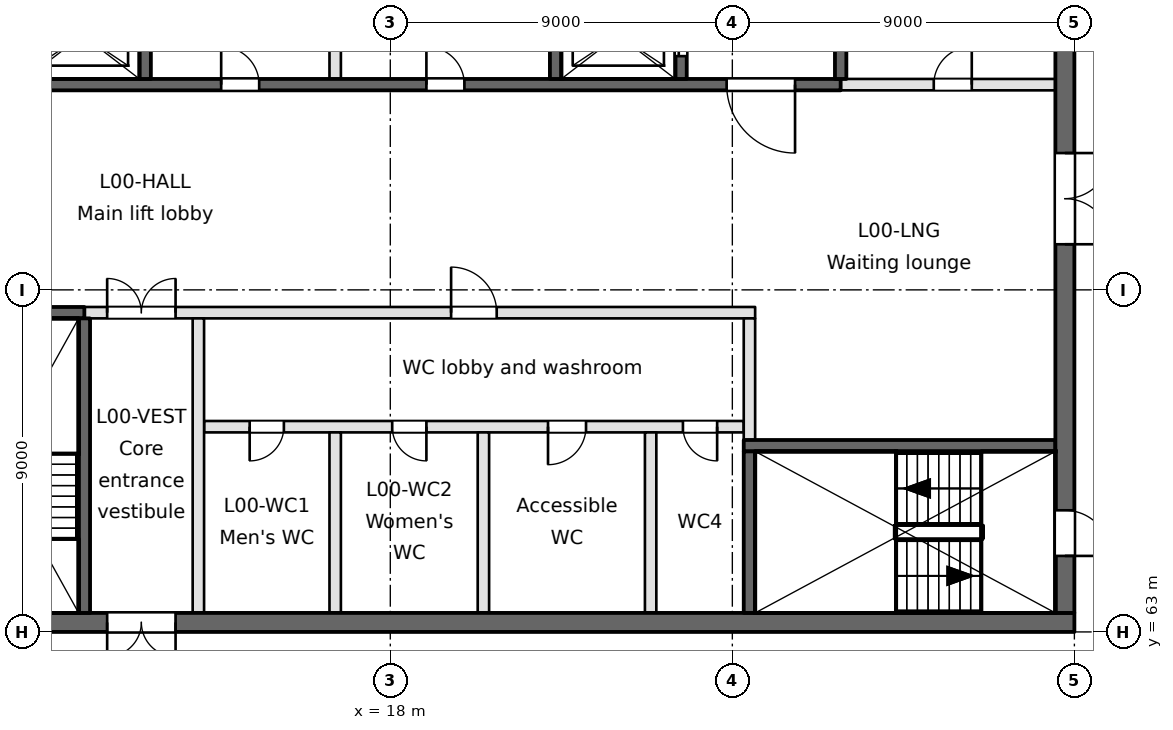
"""IFC4 building model, lengths in metres.
Left out: names, types, materials, properties, quantities, classifications, styles, units other than length and angle.
Written with IfcOpenShell. Run it as: python <this file> out.ifc"""

import sys

from ifc_helpers import new_model, si_unit, direction, frame, frame_2d, origin, place, context, subcontext, project, spatial, rectangle, extrude, element, fill, save


model = new_model("IFC4")
c1 = context("Model", 3, precision=1e-05, world=origin(), true_north=direction((0.0, 1.0)))
c2 = subcontext(c1, "Body", "Model", "MODEL_VIEW")
j1 = project(units=[si_unit("LENGTHUNIT", "METRE"), si_unit("PLANEANGLEUNIT", "RADIAN")], contexts=[c1])
p1 = place(None, origin())
s1 = spatial("IfcSite", under=j1, at=p1, CompositionType="ELEMENT")
p2 = place(p1, origin())
s2 = spatial("IfcBuilding", under=s1, at=p2, CompositionType="ELEMENT")
p3 = place(p2, origin())
s3 = spatial("IfcBuildingStorey", under=s2, at=p3, CompositionType="ELEMENT", Elevation=0.0)
p4 = place(p3, frame((0.9, 63.25, -0.4), z_axis=(0.0, 0.0, 1.0), x_axis=(1.0, 0.0, 0.0)))
e1 = element("IfcWall", 1, at=p4, inside=s3, PredefinedType="SOLIDWALL", context=c2, shape_type="SweptSolid", body=[
    extrude(rectangle(XDim=35.1, YDim=0.5, at=frame_2d((17.55, 0.0))), origin(), (0.0, 0.0, 1.0), 6.05),
])
p5 = place(p4, frame((9.65, 0.0, 0.4)))
e2 = element("IfcOpeningElement", 2, at=p5, cuts=e1, PredefinedType="OPENING", context=c2, shape_type="SweptSolid", body=[
    extrude(rectangle(XDim=1.8, YDim=2.1, at=frame_2d((0.9, 1.05))), frame((0.0, 0.25, 0.0), z_axis=(0.0, -1.0, 0.0), x_axis=(1.0, 0.0, 0.0)), (0.0, 0.0, 1.0), 0.5),
])
p6 = place(p4, frame((1.55, 0.0, 0.4)))
e3 = element("IfcOpeningElement", 3, at=p6, cuts=e1, PredefinedType="OPENING", context=c2, shape_type="SweptSolid", body=[
    extrude(rectangle(XDim=1.2, YDim=2.1, at=frame_2d((0.6, 1.05))), frame((0.0, 0.25, 0.0), z_axis=(0.0, -1.0, 0.0), x_axis=(1.0, 0.0, 0.0)), (0.0, 0.0, 1.0), 0.5),
])
p7 = place(p4, frame((6.15, 0.0, 0.4)))
e4 = element("IfcOpeningElement", 4, at=p7, cuts=e1, PredefinedType="OPENING", context=c2, shape_type="SweptSolid", body=[
    extrude(rectangle(XDim=1.2, YDim=2.1, at=frame_2d((0.6, 1.05))), frame((0.0, 0.25, 0.0), z_axis=(0.0, -1.0, 0.0), x_axis=(1.0, 0.0, 0.0)), (0.0, 0.0, 1.0), 0.5),
])
p8 = place(p3, frame((27.3, 67.9, -0.4), z_axis=(0.0, 0.0, 1.0), x_axis=(1.0, 0.0, 0.0)))
e5 = element("IfcWall", 5, at=p8, inside=s3, PredefinedType="SOLIDWALL", context=c2, shape_type="SweptSolid", body=[
    extrude(rectangle(XDim=8.2, YDim=0.3, at=frame_2d((4.1, 0.0))), origin(), (0.0, 0.0, 1.0), 6.05),
])
p9 = place(p3, frame((13.1, 68.4, 0.0), z_axis=(0.0, 0.0, 1.0), x_axis=(1.0, 0.0, 0.0)))
e6 = element("IfcWall", 6, at=p9, inside=s3, PredefinedType="PARTITIONING", context=c2, shape_type="SweptSolid", body=[
    extrude(rectangle(XDim=14.2, YDim=0.3, at=frame_2d((7.1, 0.0))), origin(), (0.0, 0.0, 1.0), 5.65),
])
p10 = place(p9, frame((1.2, 0.0, 0.0)))
e7 = element("IfcOpeningElement", 7, at=p10, cuts=e6, PredefinedType="OPENING", context=c2, shape_type="SweptSolid", body=[
    extrude(rectangle(XDim=0.9, YDim=2.1, at=frame_2d((0.45, 1.05))), frame((0.0, 0.15, 0.0), z_axis=(0.0, -1.0, 0.0), x_axis=(1.0, 0.0, 0.0)), (0.0, 0.0, 1.0), 0.3),
])
p11 = place(p9, frame((4.95, 0.0, 0.0)))
e8 = element("IfcOpeningElement", 8, at=p11, cuts=e6, PredefinedType="OPENING", context=c2, shape_type="SweptSolid", body=[
    extrude(rectangle(XDim=0.9, YDim=2.1, at=frame_2d((0.45, 1.05))), frame((0.0, 0.15, 0.0), z_axis=(0.0, -1.0, 0.0), x_axis=(1.0, 0.0, 0.0)), (0.0, 0.0, 1.0), 0.3),
])
p12 = place(p9, frame((9.05, 0.0, 0.0)))
e9 = element("IfcOpeningElement", 9, at=p12, cuts=e6, PredefinedType="OPENING", context=c2, shape_type="SweptSolid", body=[
    extrude(rectangle(XDim=1.0, YDim=2.1, at=frame_2d((0.5, 1.05))), frame((0.0, 0.15, 0.0), z_axis=(0.0, -1.0, 0.0), x_axis=(1.0, 0.0, 0.0)), (0.0, 0.0, 1.0), 0.3),
])
p13 = place(p9, frame((12.6, 0.0, 0.0)))
e10 = element("IfcOpeningElement", 10, at=p13, cuts=e6, PredefinedType="OPENING", context=c2, shape_type="SweptSolid", body=[
    extrude(rectangle(XDim=0.9, YDim=2.1, at=frame_2d((0.45, 1.05))), frame((0.0, 0.15, 0.0), z_axis=(0.0, -1.0, 0.0), x_axis=(1.0, 0.0, 0.0)), (0.0, 0.0, 1.0), 0.3),
])
p14 = place(p3, frame((0.9, 71.4, -0.4), z_axis=(0.0, 0.0, 1.0), x_axis=(1.0, 0.0, 0.0)))
e11 = element("IfcWall", 11, at=p14, inside=s3, PredefinedType="SOLIDWALL", context=c2, shape_type="SweptSolid", body=[
    extrude(rectangle(XDim=9.05, YDim=0.3, at=frame_2d((4.525, 0.0))), origin(), (0.0, 0.0, 1.0), 6.05),
])
p15 = place(p3, frame((9.95, 71.4, 0.0), z_axis=(0.0, 0.0, 1.0), x_axis=(1.0, 0.0, 0.0)))
e12 = element("IfcWall", 12, at=p15, inside=s3, PredefinedType="PARTITIONING", context=c2, shape_type="SweptSolid", body=[
    extrude(rectangle(XDim=17.65, YDim=0.3, at=frame_2d((8.825, 0.0))), origin(), (0.0, 0.0, 1.0), 5.65),
])
p16 = place(p15, frame((0.6, 0.0, 0.0)))
e13 = element("IfcOpeningElement", 13, at=p16, cuts=e12, PredefinedType="OPENING", context=c2, shape_type="SweptSolid", body=[
    extrude(rectangle(XDim=1.8, YDim=2.1, at=frame_2d((0.9, 1.05))), frame((0.0, 0.15, 0.0), z_axis=(0.0, -1.0, 0.0), x_axis=(1.0, 0.0, 0.0)), (0.0, 0.0, 1.0), 0.3),
])
p17 = place(p15, frame((9.65, 0.0, 0.0)))
e14 = element("IfcOpeningElement", 14, at=p17, cuts=e12, PredefinedType="OPENING", context=c2, shape_type="SweptSolid", body=[
    extrude(rectangle(XDim=1.2, YDim=2.1, at=frame_2d((0.6, 1.05))), frame((0.0, 0.15, 0.0), z_axis=(0.0, -1.0, 0.0), x_axis=(1.0, 0.0, 0.0)), (0.0, 0.0, 1.0), 0.3),
])
p18 = place(p3, frame((0.9, 77.4, -0.4), z_axis=(0.0, 0.0, 1.0), x_axis=(1.0, 0.0, 0.0)))
e15 = element("IfcWall", 15, at=p18, inside=s3, PredefinedType="SOLIDWALL", context=c2, shape_type="SweptSolid", body=[
    extrude(rectangle(XDim=28.95, YDim=0.3, at=frame_2d((14.475, 0.0))), origin(), (0.0, 0.0, 1.0), 6.05),
])
p19 = place(p18, frame((4.35, 0.0, 0.4)))
e16 = element("IfcOpeningElement", 16, at=p19, cuts=e15, PredefinedType="OPENING", context=c2, shape_type="SweptSolid", body=[
    extrude(rectangle(XDim=1.8, YDim=2.1, at=frame_2d((0.9, 1.05))), frame((0.0, 0.15, 0.0), z_axis=(0.0, -1.0, 0.0), x_axis=(1.0, 0.0, 0.0)), (0.0, 0.0, 1.0), 0.3),
])
p20 = place(p18, frame((25.95, 0.0, 0.4)))
e17 = element("IfcOpeningElement", 17, at=p20, cuts=e15, PredefinedType="OPENING", context=c2, shape_type="SweptSolid", body=[
    extrude(rectangle(XDim=1.8, YDim=2.1, at=frame_2d((0.9, 1.05))), frame((0.0, 0.15, 0.0), z_axis=(0.0, -1.0, 0.0), x_axis=(1.0, 0.0, 0.0)), (0.0, 0.0, 1.0), 0.3),
])
p21 = place(p18, frame((12.65, 0.0, 0.4)))
e18 = element("IfcOpeningElement", 18, at=p21, cuts=e15, PredefinedType="OPENING", context=c2, shape_type="SweptSolid", body=[
    extrude(rectangle(XDim=1.0, YDim=2.1, at=frame_2d((0.5, 1.05))), frame((0.0, 0.15, 0.0), z_axis=(0.0, -1.0, 0.0), x_axis=(1.0, 0.0, 0.0)), (0.0, 0.0, 1.0), 0.3),
])
p22 = place(p18, frame((18.05, 0.0, 0.4)))
e19 = element("IfcOpeningElement", 19, at=p22, cuts=e15, PredefinedType="OPENING", context=c2, shape_type="SweptSolid", body=[
    extrude(rectangle(XDim=1.0, YDim=2.1, at=frame_2d((0.5, 1.05))), frame((0.0, 0.15, 0.0), z_axis=(0.0, -1.0, 0.0), x_axis=(1.0, 0.0, 0.0)), (0.0, 0.0, 1.0), 0.3),
])
p23 = place(p3, frame((29.85, 77.4, 0.0), z_axis=(0.0, 0.0, 1.0), x_axis=(1.0, 0.0, 0.0)))
e20 = element("IfcWall", 20, at=p23, inside=s3, PredefinedType="PARTITIONING", context=c2, shape_type="SweptSolid", body=[
    extrude(rectangle(XDim=5.65, YDim=0.3, at=frame_2d((2.825, 0.0))), origin(), (0.0, 0.0, 1.0), 5.65),
])
p24 = place(p23, frame((2.45, 0.0, 0.0)))
e21 = element("IfcOpeningElement", 21, at=p24, cuts=e20, PredefinedType="OPENING", context=c2, shape_type="SweptSolid", body=[
    extrude(rectangle(XDim=1.0, YDim=2.1, at=frame_2d((0.5, 1.05))), frame((0.0, 0.15, 0.0), z_axis=(0.0, -1.0, 0.0), x_axis=(1.0, 0.0, 0.0)), (0.0, 0.0, 1.0), 0.3),
])
p25 = place(p3, frame((9.95, 63.5, -0.4), z_axis=(0.0, 0.0, 1.0), x_axis=(0.0, 1.0, 0.0)))
e22 = element("IfcWall", 22, at=p25, inside=s3, PredefinedType="SOLIDWALL", context=c2, shape_type="SweptSolid", body=[
    extrude(rectangle(XDim=7.75, YDim=0.3, at=frame_2d((3.875, 0.0))), origin(), (0.0, 0.0, 1.0), 6.05),
])
p26 = place(p3, frame((11.55, 77.55, -0.4), z_axis=(0.0, 0.0, 1.0), x_axis=(0.0, 1.0, 0.0)))
e23 = element("IfcWall", 23, at=p26, inside=s3, PredefinedType="SOLIDWALL", context=c2, shape_type="SweptSolid", body=[
    extrude(rectangle(XDim=10.1, YDim=0.3, at=frame_2d((5.05, 0.0))), origin(), (0.0, 0.0, 1.0), 6.05),
])
p27 = place(p3, frame((12.95, 63.5, 0.0), z_axis=(0.0, 0.0, 1.0), x_axis=(0.0, 1.0, 0.0)))
e24 = element("IfcWall", 24, at=p27, inside=s3, PredefinedType="PARTITIONING", context=c2, shape_type="SweptSolid", body=[
    extrude(rectangle(XDim=7.75, YDim=0.3, at=frame_2d((3.875, 0.0))), origin(), (0.0, 0.0, 1.0), 5.65),
])
p28 = place(p3, frame((16.55, 63.5, 0.0), z_axis=(0.0, 0.0, 1.0), x_axis=(0.0, 1.0, 0.0)))
e25 = element("IfcWall", 25, at=p28, inside=s3, PredefinedType="PARTITIONING", context=c2, shape_type="SweptSolid", body=[
    extrude(rectangle(XDim=4.75, YDim=0.3, at=frame_2d((2.375, 0.0))), origin(), (0.0, 0.0, 1.0), 5.65),
])
p29 = place(p3, frame((16.55, 77.55, 0.0), z_axis=(0.0, 0.0, 1.0), x_axis=(0.0, 1.0, 0.0)))
e26 = element("IfcWall", 26, at=p29, inside=s3, PredefinedType="PARTITIONING", context=c2, shape_type="SweptSolid", body=[
    extrude(rectangle(XDim=12.95, YDim=0.3, at=frame_2d((6.475, 0.0))), origin(), (0.0, 0.0, 1.0), 5.65),
])
p30 = place(p3, frame((20.45, 63.5, 0.0), z_axis=(0.0, 0.0, 1.0), x_axis=(0.0, 1.0, 0.0)))
e27 = element("IfcWall", 27, at=p30, inside=s3, PredefinedType="PARTITIONING", context=c2, shape_type="SweptSolid", body=[
    extrude(rectangle(XDim=4.75, YDim=0.3, at=frame_2d((2.375, 0.0))), origin(), (0.0, 0.0, 1.0), 5.65),
])
p31 = place(p3, frame((22.35, 77.55, -0.4), z_axis=(0.0, 0.0, 1.0), x_axis=(0.0, 1.0, 0.0)))
e28 = element("IfcWall", 28, at=p31, inside=s3, PredefinedType="SOLIDWALL", context=c2, shape_type="SweptSolid", body=[
    extrude(rectangle(XDim=10.1, YDim=0.3, at=frame_2d((5.05, 0.0))), origin(), (0.0, 0.0, 1.0), 6.05),
])
p32 = place(p3, frame((24.85, 63.5, 0.0), z_axis=(0.0, 0.0, 1.0), x_axis=(0.0, 1.0, 0.0)))
e29 = element("IfcWall", 29, at=p32, inside=s3, PredefinedType="PARTITIONING", context=c2, shape_type="SweptSolid", body=[
    extrude(rectangle(XDim=4.75, YDim=0.3, at=frame_2d((2.375, 0.0))), origin(), (0.0, 0.0, 1.0), 5.65),
])
p33 = place(p3, frame((25.65, 77.55, -0.4), z_axis=(0.0, 0.0, 1.0), x_axis=(0.0, 1.0, 0.0)))
e30 = element("IfcWall", 30, at=p33, inside=s3, PredefinedType="SOLIDWALL", context=c2, shape_type="SweptSolid", body=[
    extrude(rectangle(XDim=10.1, YDim=0.3, at=frame_2d((5.05, 0.0))), origin(), (0.0, 0.0, 1.0), 6.05),
])
p34 = place(p33, frame((0.6, 0.0, 0.4)))
e31 = element("IfcOpeningElement", 31, at=p34, cuts=e30, PredefinedType="OPENING", context=c2, shape_type="SweptSolid", body=[
    extrude(rectangle(XDim=1.1, YDim=2.1, at=frame_2d((0.55, 1.05))), frame((0.0, 0.15, 0.0), z_axis=(0.0, -1.0, 0.0), x_axis=(1.0, 0.0, 0.0)), (0.0, 0.0, 1.0), 0.3),
])
p35 = place(p33, frame((3.2, 0.0, 0.4)))
e32 = element("IfcOpeningElement", 32, at=p35, cuts=e30, PredefinedType="OPENING", context=c2, shape_type="SweptSolid", body=[
    extrude(rectangle(XDim=1.1, YDim=2.1, at=frame_2d((0.55, 1.05))), frame((0.0, 0.15, 0.0), z_axis=(0.0, -1.0, 0.0), x_axis=(1.0, 0.0, 0.0)), (0.0, 0.0, 1.0), 0.3),
])
p36 = place(p33, frame((5.8, 0.0, 0.4)))
e33 = element("IfcOpeningElement", 33, at=p36, cuts=e30, PredefinedType="OPENING", context=c2, shape_type="SweptSolid", body=[
    extrude(rectangle(XDim=1.1, YDim=2.1, at=frame_2d((0.55, 1.05))), frame((0.0, 0.15, 0.0), z_axis=(0.0, -1.0, 0.0), x_axis=(1.0, 0.0, 0.0)), (0.0, 0.0, 1.0), 0.3),
])
p37 = place(p33, frame((8.4, 0.0, 0.4)))
e34 = element("IfcOpeningElement", 34, at=p37, cuts=e30, PredefinedType="OPENING", context=c2, shape_type="SweptSolid", body=[
    extrude(rectangle(XDim=1.1, YDim=2.1, at=frame_2d((0.55, 1.05))), frame((0.0, 0.15, 0.0), z_axis=(0.0, -1.0, 0.0), x_axis=(1.0, 0.0, 0.0)), (0.0, 0.0, 1.0), 0.3),
])
p38 = place(p3, frame((27.45, 63.5, -0.4), z_axis=(0.0, 0.0, 1.0), x_axis=(0.0, 1.0, 0.0)))
e35 = element("IfcWall", 35, at=p38, inside=s3, PredefinedType="SOLIDWALL", context=c2, shape_type="SweptSolid", body=[
    extrude(rectangle(XDim=4.25, YDim=0.3, at=frame_2d((2.125, 0.0))), origin(), (0.0, 0.0, 1.0), 6.05),
])
p39 = place(p3, frame((27.45, 68.05, 0.0), z_axis=(0.0, 0.0, 1.0), x_axis=(0.0, 1.0, 0.0)))
e36 = element("IfcWall", 36, at=p39, inside=s3, PredefinedType="PARTITIONING", context=c2, shape_type="SweptSolid", body=[
    extrude(rectangle(XDim=3.2, YDim=0.3, at=frame_2d((1.6, 0.0))), origin(), (0.0, 0.0, 1.0), 5.65),
])
p40 = place(p3, frame((29.85, 77.55, -0.4), z_axis=(0.0, 0.0, 1.0), x_axis=(0.0, 1.0, 0.0)))
e37 = element("IfcWall", 37, at=p40, inside=s3, PredefinedType="SOLIDWALL", context=c2, shape_type="SweptSolid", body=[
    extrude(rectangle(XDim=10.1, YDim=0.3, at=frame_2d((5.05, 0.0))), origin(), (0.0, 0.0, 1.0), 6.05),
])
p41 = place(p3, frame((35.75, 63.5, -0.4), z_axis=(0.0, 0.0, 1.0), x_axis=(0.0, 1.0, 0.0)))
e38 = element("IfcWall", 38, at=p41, inside=s3, PredefinedType="SOLIDWALL", context=c2, shape_type="SweptSolid", body=[
    extrude(rectangle(XDim=34.6, YDim=0.5, at=frame_2d((17.3, 0.0))), origin(), (0.0, 0.0, 1.0), 6.05),
])
p42 = place(p41, frame((9.7, 0.0, 0.4)))
e39 = element("IfcOpeningElement", 39, at=p42, cuts=e38, PredefinedType="OPENING", context=c2, shape_type="SweptSolid", body=[
    extrude(rectangle(XDim=2.4, YDim=2.1, at=frame_2d((1.2, 1.05))), frame((0.0, 0.25, 0.0), z_axis=(0.0, -1.0, 0.0), x_axis=(1.0, 0.0, 0.0)), (0.0, 0.0, 1.0), 0.5),
])
p43 = place(p41, frame((27.9, 0.0, 0.4)))
e40 = element("IfcOpeningElement", 40, at=p43, cuts=e38, PredefinedType="OPENING", context=c2, shape_type="SweptSolid", body=[
    extrude(rectangle(XDim=1.5, YDim=2.1, at=frame_2d((0.75, 1.05))), frame((0.0, 0.25, 0.0), z_axis=(0.0, -1.0, 0.0), x_axis=(1.0, 0.0, 0.0)), (0.0, 0.0, 1.0), 0.5),
])
p44 = place(p41, frame((1.5, 0.0, 0.4)))
e41 = element("IfcOpeningElement", 41, at=p44, cuts=e38, PredefinedType="OPENING", context=c2, shape_type="SweptSolid", body=[
    extrude(rectangle(XDim=1.2, YDim=2.1, at=frame_2d((0.6, 1.05))), frame((0.0, 0.25, 0.0), z_axis=(0.0, -1.0, 0.0), x_axis=(1.0, 0.0, 0.0)), (0.0, 0.0, 1.0), 0.5),
])
p45 = place(p34, origin())
e42 = element("IfcDoor", 42, at=p45, inside=s3, OperationType="SLIDING_TO_RIGHT", PredefinedType="DOOR", context=c2, shape_type="SweptSolid", body=[
    extrude(rectangle(XDim=1.1, YDim=2.1, at=frame_2d((0.55, 1.05))), frame((0.0, 0.025, 0.0), z_axis=(0.0, -1.0, 0.0), x_axis=(1.0, 0.0, 0.0)), (0.0, 0.0, 1.0), 0.05),
])
fill(e31, e42)
p46 = place(p20, frame((1.8, 0.0, 0.0), z_axis=(0.0, 0.0, 1.0), x_axis=(-1.0, 0.0, 0.0)))
e43 = element("IfcDoor", 43, at=p46, inside=s3, OperationType="SINGLE_SWING_LEFT", PredefinedType="DOOR", context=c2, shape_type="SweptSolid", body=[
    extrude(rectangle(XDim=1.8, YDim=2.1, at=frame_2d((0.9, 1.05))), frame((0.0, 0.025, 0.0), z_axis=(0.0, -1.0, 0.0), x_axis=(1.0, 0.0, 0.0)), (0.0, 0.0, 1.0), 0.05),
])
fill(e17, e43)
p47 = place(p42, frame((2.4, 0.0, 0.0), z_axis=(0.0, 0.0, 1.0), x_axis=(-1.0, 0.0, 0.0)))
e44 = element("IfcDoor", 44, at=p47, inside=s3, OperationType="DOUBLE_DOOR_SINGLE_SWING", PredefinedType="DOOR", context=c2, shape_type="SweptSolid", body=[
    extrude(rectangle(XDim=2.4, YDim=2.1, at=frame_2d((1.2, 1.05))), frame((0.0, 0.025, 0.0), z_axis=(0.0, -1.0, 0.0), x_axis=(1.0, 0.0, 0.0)), (0.0, 0.0, 1.0), 0.05),
])
fill(e39, e44)
p48 = place(p5, frame((1.8, 0.0, 0.0), z_axis=(0.0, 0.0, 1.0), x_axis=(-1.0, 0.0, 0.0)))
e45 = element("IfcDoor", 45, at=p48, inside=s3, OperationType="DOUBLE_DOOR_SINGLE_SWING", PredefinedType="DOOR", context=c2, shape_type="SweptSolid", body=[
    extrude(rectangle(XDim=1.8, YDim=2.1, at=frame_2d((0.9, 1.05))), frame((0.0, 0.025, 0.0), z_axis=(0.0, -1.0, 0.0), x_axis=(1.0, 0.0, 0.0)), (0.0, 0.0, 1.0), 0.05),
])
fill(e2, e45)
p49 = place(p16, origin())
e46 = element("IfcDoor", 46, at=p49, inside=s3, OperationType="DOUBLE_DOOR_SINGLE_SWING", PredefinedType="DOOR", context=c2, shape_type="SweptSolid", body=[
    extrude(rectangle(XDim=1.8, YDim=2.1, at=frame_2d((0.9, 1.05))), frame((0.0, 0.025, 0.0), z_axis=(0.0, -1.0, 0.0), x_axis=(1.0, 0.0, 0.0)), (0.0, 0.0, 1.0), 0.05),
])
fill(e13, e46)
p50 = place(p10, frame((0.9, 0.0, 0.0), z_axis=(0.0, 0.0, 1.0), x_axis=(-1.0, 0.0, 0.0)))
e47 = element("IfcDoor", 47, at=p50, inside=s3, OperationType="SINGLE_SWING_RIGHT", PredefinedType="DOOR", context=c2, shape_type="SweptSolid", body=[
    extrude(rectangle(XDim=0.9, YDim=2.1, at=frame_2d((0.45, 1.05))), frame((0.0, 0.025, 0.0), z_axis=(0.0, -1.0, 0.0), x_axis=(1.0, 0.0, 0.0)), (0.0, 0.0, 1.0), 0.05),
])
fill(e7, e47)
p51 = place(p11, frame((0.9, 0.0, 0.0), z_axis=(0.0, 0.0, 1.0), x_axis=(-1.0, 0.0, 0.0)))
e48 = element("IfcDoor", 48, at=p51, inside=s3, OperationType="SINGLE_SWING_LEFT", PredefinedType="DOOR", context=c2, shape_type="SweptSolid", body=[
    extrude(rectangle(XDim=0.9, YDim=2.1, at=frame_2d((0.45, 1.05))), frame((0.0, 0.025, 0.0), z_axis=(0.0, -1.0, 0.0), x_axis=(1.0, 0.0, 0.0)), (0.0, 0.0, 1.0), 0.05),
])
fill(e8, e48)
p52 = place(p12, frame((1.0, 0.0, 0.0), z_axis=(0.0, 0.0, 1.0), x_axis=(-1.0, 0.0, 0.0)))
e49 = element("IfcDoor", 49, at=p52, inside=s3, OperationType="SINGLE_SWING_RIGHT", PredefinedType="DOOR", context=c2, shape_type="SweptSolid", body=[
    extrude(rectangle(XDim=1.0, YDim=2.1, at=frame_2d((0.5, 1.05))), frame((0.0, 0.025, 0.0), z_axis=(0.0, -1.0, 0.0), x_axis=(1.0, 0.0, 0.0)), (0.0, 0.0, 1.0), 0.05),
])
fill(e9, e49)
p53 = place(p13, frame((0.9, 0.0, 0.0), z_axis=(0.0, 0.0, 1.0), x_axis=(-1.0, 0.0, 0.0)))
e50 = element("IfcDoor", 50, at=p53, inside=s3, OperationType="SINGLE_SWING_LEFT", PredefinedType="DOOR", context=c2, shape_type="SweptSolid", body=[
    extrude(rectangle(XDim=0.9, YDim=2.1, at=frame_2d((0.45, 1.05))), frame((0.0, 0.025, 0.0), z_axis=(0.0, -1.0, 0.0), x_axis=(1.0, 0.0, 0.0)), (0.0, 0.0, 1.0), 0.05),
])
fill(e10, e50)
p54 = place(p17, origin())
e51 = element("IfcDoor", 51, at=p54, inside=s3, OperationType="SINGLE_SWING_LEFT", PredefinedType="DOOR", context=c2, shape_type="SweptSolid", body=[
    extrude(rectangle(XDim=1.2, YDim=2.1, at=frame_2d((0.6, 1.05))), frame((0.0, 0.025, 0.0), z_axis=(0.0, -1.0, 0.0), x_axis=(1.0, 0.0, 0.0)), (0.0, 0.0, 1.0), 0.05),
])
fill(e14, e51)
p55 = place(p44, frame((1.2, 0.0, 0.0), z_axis=(0.0, 0.0, 1.0), x_axis=(-1.0, 0.0, 0.0)))
e52 = element("IfcDoor", 52, at=p55, inside=s3, OperationType="SINGLE_SWING_RIGHT", PredefinedType="DOOR", context=c2, shape_type="SweptSolid", body=[
    extrude(rectangle(XDim=1.2, YDim=2.1, at=frame_2d((0.6, 1.05))), frame((0.0, 0.025, 0.0), z_axis=(0.0, -1.0, 0.0), x_axis=(1.0, 0.0, 0.0)), (0.0, 0.0, 1.0), 0.05),
])
fill(e41, e52)
p56 = place(p21, origin())
e53 = element("IfcDoor", 53, at=p56, inside=s3, OperationType="SINGLE_SWING_LEFT", PredefinedType="DOOR", context=c2, shape_type="SweptSolid", body=[
    extrude(rectangle(XDim=1.0, YDim=2.1, at=frame_2d((0.5, 1.05))), frame((0.0, 0.025, 0.0), z_axis=(0.0, -1.0, 0.0), x_axis=(1.0, 0.0, 0.0)), (0.0, 0.0, 1.0), 0.05),
])
fill(e18, e53)
p57 = place(p22, origin())
e54 = element("IfcDoor", 54, at=p57, inside=s3, OperationType="SINGLE_SWING_LEFT", PredefinedType="DOOR", context=c2, shape_type="SweptSolid", body=[
    extrude(rectangle(XDim=1.0, YDim=2.1, at=frame_2d((0.5, 1.05))), frame((0.0, 0.025, 0.0), z_axis=(0.0, -1.0, 0.0), x_axis=(1.0, 0.0, 0.0)), (0.0, 0.0, 1.0), 0.05),
])
fill(e19, e54)
p58 = place(p24, origin())
e55 = element("IfcDoor", 55, at=p58, inside=s3, OperationType="SINGLE_SWING_RIGHT", PredefinedType="DOOR", context=c2, shape_type="SweptSolid", body=[
    extrude(rectangle(XDim=1.0, YDim=2.1, at=frame_2d((0.5, 1.05))), frame((0.0, 0.025, 0.0), z_axis=(0.0, -1.0, 0.0), x_axis=(1.0, 0.0, 0.0)), (0.0, 0.0, 1.0), 0.05),
])
fill(e21, e55)
save(model, sys.argv[1])
